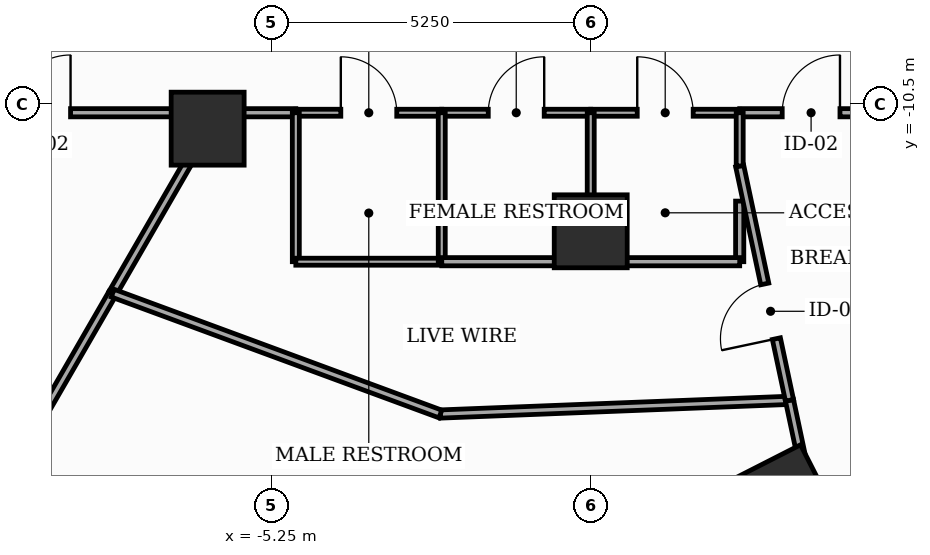
"""IFC4 building model, lengths in metres.
Left out: names, types, materials, properties, quantities, classifications, styles, units other than length and angle.
Written with IfcOpenShell. Run it as: python <this file> out.ifc"""

import sys

from ifc_helpers import new_model, si_unit, direction, frame, frame_2d, origin, origin_2d, place, context, subcontext, project, spatial, rectangle, extrude, element, fill, save


model = new_model("IFC4")
c1 = context("Model", 3, precision=1e-05, world=origin(), true_north=direction((0.0, 1.0)))
c2 = subcontext(c1, "Body", "Model", "MODEL_VIEW")
j1 = project(units=[si_unit("LENGTHUNIT", "METRE"), si_unit("PLANEANGLEUNIT", "RADIAN")], contexts=[c1])
p1 = place(None, origin())
s1 = spatial("IfcSite", under=j1, at=p1, CompositionType="ELEMENT")
p2 = place(p1, origin())
s2 = spatial("IfcBuilding", under=s1, at=p2, CompositionType="ELEMENT")
p3 = place(p2, frame((0.0, 0.0, 145.8)))
s3 = spatial("IfcBuildingStorey", under=s2, at=p3, CompositionType="ELEMENT", Elevation=145.8)
for number, where, z_axis, x_axis in (
    (1, (-6.3, -10.912, 0.0), (0.0, 0.0, 1.0), (1.0, 0.0, 0.0)),
    (2, (0.0, -12.6, 0.0), (0.0, 0.0, 1.0), (1.0, 0.0, 0.0)),
    (3, (3.188, -16.918, 0.0), (0.0, 0.0, 1.0), (0.891, 0.454, 0.0)),
):
    element("IfcColumn", number, at=place(p3, frame(where, z_axis=z_axis, x_axis=x_axis)), inside=s3, PredefinedType="COLUMN", context=c2, shape_type="SweptSolid", body=[
        extrude(rectangle(XDim=1.2, YDim=1.2, at=origin_2d()), origin(), (0.0, 0.0, 1.0), 3.7),
    ])
p4 = place(p3, frame((-10.15, -10.65, 0.0), z_axis=(0.0, 0.0, 1.0), x_axis=(1.0, 0.0, 0.0)))
e4 = element("IfcWall", 4, at=p4, inside=s3, PredefinedType="PARTITIONING", context=c2, shape_type="SweptSolid", body=[
    extrude(rectangle(XDim=4.001, YDim=0.135, at=frame_2d((2.0, 0.0))), origin(), (0.0, 0.0, 1.0), 2.045),
])
p5 = place(p4, frame((0.645, 0.0, 0.0)))
e5 = element("IfcOpeningElement", 5, at=p5, cuts=e4, PredefinedType="OPENING", context=c2, shape_type="SweptSolid", body=[
    extrude(rectangle(XDim=0.95, YDim=2.0, at=frame_2d((0.475, 1.0))), frame((0.0, 0.077, 0.0), z_axis=(0.0, -1.0, 0.0), x_axis=(1.0, 0.0, 0.0)), (0.0, 0.0, 1.0), 0.155),
])
p6 = place(p3, frame((-4.85, -10.65, 0.0), z_axis=(0.0, 0.0, 1.0), x_axis=(1.0, 0.0, 0.0)))
e6 = element("IfcWall", 6, at=p6, inside=s3, PredefinedType="PARTITIONING", context=c2, shape_type="SweptSolid", body=[
    extrude(rectangle(XDim=2.4, YDim=0.115, at=frame_2d((1.2, 0.0))), origin(), (0.0, 0.0, 1.0), 3.46),
])
p7 = place(p6, frame((0.74, 0.0, 0.0)))
e7 = element("IfcOpeningElement", 7, at=p7, cuts=e6, PredefinedType="OPENING", context=c2, shape_type="SweptSolid", body=[
    extrude(rectangle(XDim=0.92, YDim=2.1, at=frame_2d((0.46, 1.05))), frame((0.0, 0.067, 0.0), z_axis=(0.0, -1.0, 0.0), x_axis=(1.0, 0.0, 0.0)), (0.0, 0.0, 1.0), 0.135),
])
p8 = place(p3, frame((-6.149, -10.65, 0.0), z_axis=(0.0, 0.0, 1.0), x_axis=(1.0, 0.0, 0.0)))
e8 = element("IfcWall", 8, at=p8, inside=s3, PredefinedType="PARTITIONING", context=c2, shape_type="SweptSolid", body=[
    extrude(rectangle(XDim=1.299, YDim=0.135, at=frame_2d((0.649, 0.0))), origin(), (0.0, 0.0, 1.0), 3.46),
])
p9 = place(p3, frame((-2.45, -10.65, 0.0), z_axis=(0.0, 0.0, 1.0), x_axis=(1.0, 0.0, 0.0)))
e9 = element("IfcWall", 9, at=p9, inside=s3, PredefinedType="PARTITIONING", context=c2, shape_type="SweptSolid", body=[
    extrude(rectangle(XDim=2.45, YDim=0.115, at=frame_2d((1.225, 0.0))), origin(), (0.0, 0.0, 1.0), 2.745),
])
p10 = place(p9, frame((0.765, 0.0, 0.0)))
e10 = element("IfcOpeningElement", 10, at=p10, cuts=e9, PredefinedType="OPENING", context=c2, shape_type="SweptSolid", body=[
    extrude(rectangle(XDim=0.92, YDim=2.1, at=frame_2d((0.46, 1.05))), frame((0.0, 0.067, 0.0), z_axis=(0.0, -1.0, 0.0), x_axis=(1.0, 0.0, 0.0)), (0.0, 0.0, 1.0), 0.135),
])
p11 = place(p3, frame((0.0, -10.65, 0.0), z_axis=(0.0, 0.0, 1.0), x_axis=(1.0, 0.0, 0.0)))
e11 = element("IfcWall", 11, at=p11, inside=s3, PredefinedType="PARTITIONING", context=c2, shape_type="SweptSolid", body=[
    extrude(rectangle(XDim=2.45, YDim=0.115, at=frame_2d((1.225, 0.0))), origin(), (0.0, 0.0, 1.0), 3.46),
])
p12 = place(p11, frame((0.765, 0.0, 0.0)))
e12 = element("IfcOpeningElement", 12, at=p12, cuts=e11, PredefinedType="OPENING", context=c2, shape_type="SweptSolid", body=[
    extrude(rectangle(XDim=0.92, YDim=2.1, at=frame_2d((0.46, 1.05))), frame((0.0, 0.067, 0.0), z_axis=(0.0, -1.0, 0.0), x_axis=(1.0, 0.0, 0.0)), (0.0, 0.0, 1.0), 0.135),
])
p13 = place(p3, frame((2.45, -10.65, 0.0), z_axis=(0.0, 0.0, 1.0), x_axis=(1.0, 0.0, 0.0)))
e13 = element("IfcWall", 13, at=p13, inside=s3, PredefinedType="PARTITIONING", context=c2, shape_type="SweptSolid", body=[
    extrude(rectangle(XDim=5.871, YDim=0.135, at=frame_2d((2.936, 0.0))), origin(), (0.0, 0.0, 1.0), 2.045),
])
p14 = place(p13, frame((0.699, 0.0, 0.0)))
e14 = element("IfcOpeningElement", 14, at=p14, cuts=e13, PredefinedType="OPENING", context=c2, shape_type="SweptSolid", body=[
    extrude(rectangle(XDim=0.95, YDim=2.0, at=frame_2d((0.475, 1.0))), frame((0.0, 0.077, 0.0), z_axis=(0.0, -1.0, 0.0), x_axis=(1.0, 0.0, 0.0)), (0.0, 0.0, 1.0), 0.155),
])
p15 = place(p3, frame((-15.633, -27.077, 0.0), z_axis=(0.0, 0.0, 1.0), x_axis=(0.499977642092, 0.866038311744, 0.0)))
e15 = element("IfcWall", 15, at=p15, inside=s3, PredefinedType="PARTITIONING", context=c2, shape_type="SweptSolid", body=[
    extrude(rectangle(XDim=15.542, YDim=0.135, at=frame_2d((7.771, 0.0))), origin(), (0.0, 0.0, 1.0), 2.045),
])
p16 = place(p15, frame((7.311, 0.0, 0.0)))
e16 = element("IfcOpeningElement", 16, at=p16, cuts=e15, PredefinedType="OPENING", context=c2, shape_type="SweptSolid", body=[
    extrude(rectangle(XDim=0.92, YDim=2.0, at=frame_2d((0.46, 1.0))), frame((0.0, 0.077, 0.0), z_axis=(0.0, -1.0, 0.0), x_axis=(1.0, 0.0, 0.0)), (0.0, 0.0, 1.0), 0.155),
])
p17 = place(p3, frame((-7.862, -13.617, 0.0), z_axis=(0.0, 0.0, 1.0), x_axis=(0.500024700597, 0.866011142419, 0.0)))
e17 = element("IfcWall", 17, at=p17, inside=s3, PredefinedType="PARTITIONING", context=c2, shape_type="SweptSolid", body=[
    extrude(rectangle(XDim=3.426, YDim=0.135, at=frame_2d((1.713, 0.0))), origin(), (0.0, 0.0, 1.0), 2.045),
])
p18 = place(p3, frame((3.269, -15.38, 0.0), z_axis=(0.0, 0.0, 1.0), x_axis=(-0.999232211705, -0.039178911299, 0.0)))
e18 = element("IfcWall", 18, at=p18, inside=s3, PredefinedType="PARTITIONING", context=c2, shape_type="SweptSolid", body=[
    extrude(rectangle(XDim=5.745, YDim=0.135, at=frame_2d((2.873, 0.0))), origin(), (0.0, 0.0, 1.0), 2.045),
])
p19 = place(p3, frame((-2.472, -15.605, 0.0), z_axis=(0.0, 0.0, 1.0), x_axis=(-0.938218989818, 0.34604208869, 0.0)))
e19 = element("IfcWall", 19, at=p19, inside=s3, PredefinedType="PARTITIONING", context=c2, shape_type="SweptSolid", body=[
    extrude(rectangle(XDim=5.745, YDim=0.135, at=frame_2d((2.873, 0.0))), origin(), (0.0, 0.0, 1.0), 3.46),
])
p20 = place(p3, frame((3.808, -17.916, 0.0), z_axis=(0.0, 0.0, 1.0), x_axis=(-0.207728113852, 0.978186603218, 0.0)))
e20 = element("IfcWall", 20, at=p20, inside=s3, PredefinedType="PARTITIONING", context=c2, shape_type="SweptSolid", body=[
    extrude(rectangle(XDim=2.593, YDim=0.135, at=frame_2d((1.296, 0.0))), origin(), (0.0, 0.0, 1.0), 2.045),
])
p21 = place(p3, frame((-4.85, -10.65, 0.0), z_axis=(0.0, 0.0, 1.0), x_axis=(0.0, -1.0, 0.0)))
e21 = element("IfcWall", 21, at=p21, inside=s3, PredefinedType="PARTITIONING", context=c2, shape_type="SweptSolid", body=[
    extrude(rectangle(XDim=2.45, YDim=0.115, at=frame_2d((1.225, 0.0))), origin(), (0.0, 0.0, 1.0), 2.745),
])
p22 = place(p3, frame((-4.85, -13.1, 0.0), z_axis=(0.0, 0.0, 1.0), x_axis=(1.0, 0.0, 0.0)))
e22 = element("IfcWall", 22, at=p22, inside=s3, PredefinedType="PARTITIONING", context=c2, shape_type="SweptSolid", body=[
    extrude(rectangle(XDim=2.4, YDim=0.115, at=frame_2d((1.2, 0.0))), origin(), (0.0, 0.0, 1.0), 3.46),
])
p23 = place(p3, frame((-2.45, -13.1, 0.0), z_axis=(0.0, 0.0, 1.0), x_axis=(0.0, 1.0, 0.0)))
e23 = element("IfcWall", 23, at=p23, inside=s3, PredefinedType="PARTITIONING", context=c2, shape_type="SweptSolid", body=[
    extrude(rectangle(XDim=2.45, YDim=0.115, at=frame_2d((1.225, 0.0))), origin(), (0.0, 0.0, 1.0), 2.745),
])
p24 = place(p3, frame((0.0, -13.1, 0.0), z_axis=(0.0, 0.0, 1.0), x_axis=(-1.0, 0.0, 0.0)))
e24 = element("IfcWall", 24, at=p24, inside=s3, PredefinedType="PARTITIONING", context=c2, shape_type="SweptSolid", body=[
    extrude(rectangle(XDim=2.45, YDim=0.135, at=frame_2d((1.225, 0.0))), origin(), (0.0, 0.0, 1.0), 2.045),
])
p25 = place(p3, frame((2.45, -12.103, 0.0), z_axis=(0.0, 0.0, 1.0), x_axis=(0.0, -1.0, 0.0)))
e25 = element("IfcWall", 25, at=p25, inside=s3, PredefinedType="PARTITIONING", context=c2, shape_type="SweptSolid", body=[
    extrude(rectangle(XDim=0.997, YDim=0.135, at=frame_2d((0.499, 0.0))), origin(), (0.0, 0.0, 1.0), 2.745),
])
p26 = place(p3, frame((2.45, -13.1, 0.0), z_axis=(0.0, 0.0, 1.0), x_axis=(-1.0, 0.0, 0.0)))
e26 = element("IfcWall", 26, at=p26, inside=s3, PredefinedType="PARTITIONING", context=c2, shape_type="SweptSolid", body=[
    extrude(rectangle(XDim=2.45, YDim=0.135, at=frame_2d((1.225, 0.0))), origin(), (0.0, 0.0, 1.0), 2.045),
])
p27 = place(p3, frame((3.269, -15.38, 0.0), z_axis=(0.0, 0.0, 1.0), x_axis=(-0.207886916666, 0.978152866314, 0.0)))
e27 = element("IfcWall", 27, at=p27, inside=s3, PredefinedType="PARTITIONING", context=c2, shape_type="SweptSolid", body=[
    extrude(rectangle(XDim=3.94, YDim=0.135, at=frame_2d((1.97, 0.0))), origin(), (0.0, 0.0, 1.0), 2.045),
])
p28 = place(p27, frame((1.037, 0.0, 0.0)))
e28 = element("IfcOpeningElement", 28, at=p28, cuts=e27, PredefinedType="OPENING", context=c2, shape_type="SweptSolid", body=[
    extrude(rectangle(XDim=0.92, YDim=2.0, at=frame_2d((0.46, 1.0))), frame((0.0, 0.077, 0.0), z_axis=(0.0, -1.0, 0.0), x_axis=(1.0, 0.0, 0.0)), (0.0, 0.0, 1.0), 0.155),
])
p29 = place(p3, frame((0.0, -13.1, 0.0), z_axis=(0.0, 0.0, 1.0), x_axis=(0.0, 1.0, 0.0)))
e29 = element("IfcWall", 29, at=p29, inside=s3, PredefinedType="PARTITIONING", context=c2, shape_type="SweptSolid", body=[
    extrude(rectangle(XDim=2.45, YDim=0.115, at=frame_2d((1.225, 0.0))), origin(), (0.0, 0.0, 1.0), 2.045),
])
p30 = place(p3, frame((2.45, -11.526, 0.0), z_axis=(0.0, 0.0, 1.0), x_axis=(0.0, 1.0, 0.0)))
e30 = element("IfcWall", 30, at=p30, inside=s3, PredefinedType="PARTITIONING", context=c2, shape_type="SweptSolid", body=[
    extrude(rectangle(XDim=0.876, YDim=0.115, at=frame_2d((0.438, 0.0))), origin(), (0.0, 0.0, 1.0), 3.46),
])
p31 = place(p5, origin())
e31 = element("IfcDoor", 31, at=p31, inside=s3, OperationType="SINGLE_SWING_RIGHT", PredefinedType="DOOR", context=c2, shape_type="SweptSolid", body=[
    extrude(rectangle(XDim=0.95, YDim=2.0, at=frame_2d((0.475, 1.0))), frame((0.0, 0.025, 0.0), z_axis=(0.0, -1.0, 0.0), x_axis=(1.0, 0.0, 0.0)), (0.0, 0.0, 1.0), 0.05),
])
fill(e5, e31)
p32 = place(p7, origin())
e32 = element("IfcDoor", 32, at=p32, inside=s3, OperationType="SINGLE_SWING_LEFT", PredefinedType="DOOR", context=c2, shape_type="SweptSolid", body=[
    extrude(rectangle(XDim=0.92, YDim=2.1, at=frame_2d((0.46, 1.05))), frame((0.0, 0.025, 0.0), z_axis=(0.0, -1.0, 0.0), x_axis=(1.0, 0.0, 0.0)), (0.0, 0.0, 1.0), 0.05),
])
fill(e7, e32)
p33 = place(p10, origin())
e33 = element("IfcDoor", 33, at=p33, inside=s3, OperationType="SINGLE_SWING_RIGHT", PredefinedType="DOOR", context=c2, shape_type="SweptSolid", body=[
    extrude(rectangle(XDim=0.92, YDim=2.1, at=frame_2d((0.46, 1.05))), frame((0.0, 0.025, 0.0), z_axis=(0.0, -1.0, 0.0), x_axis=(1.0, 0.0, 0.0)), (0.0, 0.0, 1.0), 0.05),
])
fill(e10, e33)
p34 = place(p12, origin())
e34 = element("IfcDoor", 34, at=p34, inside=s3, OperationType="SINGLE_SWING_LEFT", PredefinedType="DOOR", context=c2, shape_type="SweptSolid", body=[
    extrude(rectangle(XDim=0.92, YDim=2.1, at=frame_2d((0.46, 1.05))), frame((0.0, 0.025, 0.0), z_axis=(0.0, -1.0, 0.0), x_axis=(1.0, 0.0, 0.0)), (0.0, 0.0, 1.0), 0.05),
])
fill(e12, e34)
p35 = place(p14, origin())
e35 = element("IfcDoor", 35, at=p35, inside=s3, OperationType="SINGLE_SWING_RIGHT", PredefinedType="DOOR", context=c2, shape_type="SweptSolid", body=[
    extrude(rectangle(XDim=0.95, YDim=2.0, at=frame_2d((0.475, 1.0))), frame((0.0, 0.025, 0.0), z_axis=(0.0, -1.0, 0.0), x_axis=(1.0, 0.0, 0.0)), (0.0, 0.0, 1.0), 0.05),
])
fill(e14, e35)
p36 = place(p28, origin())
e36 = element("IfcDoor", 36, at=p36, inside=s3, OperationType="SINGLE_SWING_LEFT", PredefinedType="DOOR", context=c2, shape_type="SweptSolid", body=[
    extrude(rectangle(XDim=0.92, YDim=2.0, at=frame_2d((0.46, 1.0))), frame((0.0, 0.025, 0.0), z_axis=(0.0, -1.0, 0.0), x_axis=(1.0, 0.0, 0.0)), (0.0, 0.0, 1.0), 0.05),
])
fill(e28, e36)
save(model, sys.argv[1])
